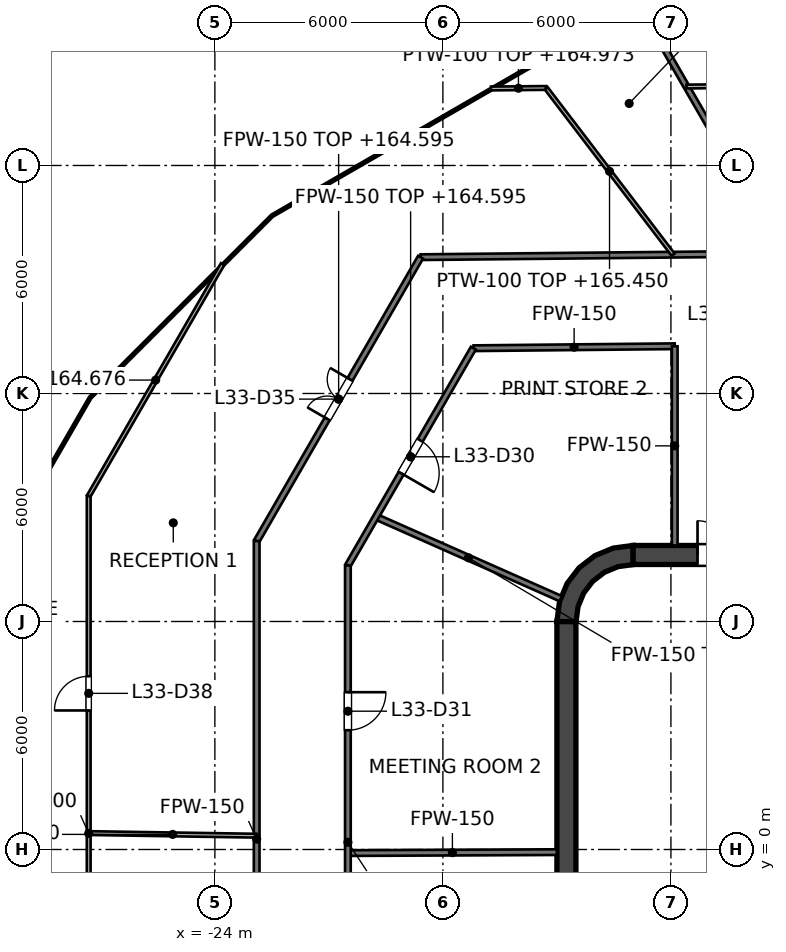
"""IFC4 building model, lengths in metres.
Left out: names, types, materials, properties, quantities, classifications, styles, units other than length and angle.
Written with IfcOpenShell. Run it as: python <this file> out.ifc"""

import sys

from ifc_helpers import new_model, si_unit, direction, frame, frame_2d, origin, place, context, subcontext, project, spatial, polyline, rectangle, outline, extrude, element, fill, save


model = new_model("IFC4")
c1 = context("Model", 3, precision=1e-05, world=origin(), true_north=direction((0.0, 1.0)))
c2 = subcontext(c1, "Body", "Model", "MODEL_VIEW")
j1 = project(units=[si_unit("LENGTHUNIT", "METRE"), si_unit("PLANEANGLEUNIT", "RADIAN")], contexts=[c1])
p1 = place(None, origin())
s1 = spatial("IfcSite", under=j1, at=p1, CompositionType="ELEMENT")
p2 = place(p1, origin())
s2 = spatial("IfcBuilding", under=s1, at=p2, CompositionType="ELEMENT")
p3 = place(p2, frame((0.0, 0.0, 161.6)))
s3 = spatial("IfcBuildingStorey", under=s2, at=p3, CompositionType="ELEMENT", Elevation=161.6)
p4 = place(p3, frame((-13.0, 7.75, 0.0), z_axis=(0.0, 0.0, 1.0), x_axis=(1.0, 0.0, 0.0)))
e1 = element("IfcWall", 1, at=p4, inside=s3, PredefinedType="SHEAR", context=c2, shape_type="SweptSolid", body=[
    extrude(rectangle(XDim=26.0, YDim=0.5, at=frame_2d((13.0, 0.0))), origin(), (0.0, 0.0, 1.0), 4.0),
])
p5 = place(p4, frame((1.7, 0.0, 0.0)))
e2 = element("IfcOpeningElement", 2, at=p5, cuts=e1, PredefinedType="OPENING", context=c2, shape_type="SweptSolid", body=[
    extrude(rectangle(XDim=1.8, YDim=2.1, at=frame_2d((0.9, 1.05))), frame((0.0, 0.25, 0.0), z_axis=(0.0, -1.0, 0.0), x_axis=(1.0, 0.0, 0.0)), (0.0, 0.0, 1.0), 0.5),
])
p6 = place(p4, frame((22.5, 0.0, 0.0)))
e3 = element("IfcOpeningElement", 3, at=p6, cuts=e1, PredefinedType="OPENING", context=c2, shape_type="SweptSolid", body=[
    extrude(rectangle(XDim=1.8, YDim=2.1, at=frame_2d((0.9, 1.05))), frame((0.0, 0.25, 0.0), z_axis=(0.0, -1.0, 0.0), x_axis=(1.0, 0.0, 0.0)), (0.0, 0.0, 1.0), 0.5),
])
p7 = place(p3, frame((-14.75, -6.0, 0.0), z_axis=(0.0, 0.0, 1.0), x_axis=(0.0, 1.0, 0.0)))
e4 = element("IfcWall", 4, at=p7, inside=s3, PredefinedType="SHEAR", context=c2, shape_type="SweptSolid", body=[
    extrude(rectangle(XDim=12.0, YDim=0.5, at=frame_2d((6.0, 0.0))), origin(), (0.0, 0.0, 1.0), 4.0),
])
p8 = place(p3, origin())
e5 = element("IfcWall", 5, at=p8, inside=s3, PredefinedType="SHEAR", context=c2, shape_type="SweptSolid", body=[
    extrude(outline(polyline([(-15.0, 6.0), (-14.496, 6.0), (-14.445, 6.387), (-14.295, 6.748), (-14.058, 7.058), (-13.748, 7.295), (-13.387, 7.445), (-13.0, 7.496), (-13.0, 8.0), (-13.518, 7.932), (-14.0, 7.732), (-14.414, 7.414), (-14.732, 7.0), (-14.932, 6.518), (-15.0, 6.0)])), origin(), (0.0, 0.0, 1.0), 4.0),
])
p9 = place(p3, frame((-11.8, -7.5, 0.0), z_axis=(0.0, 0.0, 1.0), x_axis=(0.0, 1.0, 0.0)))
e6 = element("IfcWall", 6, at=p9, inside=s3, PredefinedType="SOLIDWALL", context=c2, shape_type="SweptSolid", body=[
    extrude(rectangle(XDim=15.0, YDim=0.4, at=frame_2d((7.5, 0.0))), origin(), (0.0, 0.0, 1.0), 3.85),
])
p10 = place(p9, frame((11.3, 0.0, 0.0)))
e7 = element("IfcOpeningElement", 7, at=p10, cuts=e6, PredefinedType="OPENING", context=c2, shape_type="SweptSolid", body=[
    extrude(rectangle(XDim=1.1, YDim=2.1, at=frame_2d((0.55, 1.05))), frame((0.0, 0.2, 0.0), z_axis=(0.0, -1.0, 0.0), x_axis=(1.0, 0.0, 0.0)), (0.0, 0.0, 1.0), 0.4),
])
p11 = place(p9, frame((8.4, 0.0, 0.0)))
e8 = element("IfcOpeningElement", 8, at=p11, cuts=e6, PredefinedType="OPENING", context=c2, shape_type="SweptSolid", body=[
    extrude(rectangle(XDim=1.1, YDim=2.1, at=frame_2d((0.55, 1.05))), frame((0.0, 0.2, 0.0), z_axis=(0.0, -1.0, 0.0), x_axis=(1.0, 0.0, 0.0)), (0.0, 0.0, 1.0), 0.4),
])
p12 = place(p9, frame((5.5, 0.0, 0.0)))
e9 = element("IfcOpeningElement", 9, at=p12, cuts=e6, PredefinedType="OPENING", context=c2, shape_type="SweptSolid", body=[
    extrude(rectangle(XDim=1.1, YDim=2.1, at=frame_2d((0.55, 1.05))), frame((0.0, 0.2, 0.0), z_axis=(0.0, -1.0, 0.0), x_axis=(1.0, 0.0, 0.0)), (0.0, 0.0, 1.0), 0.4),
])
p13 = place(p9, frame((13.697, 0.0, 0.0)))
e10 = element("IfcOpeningElement", 10, at=p13, cuts=e6, PredefinedType="OPENING", context=c2, shape_type="SweptSolid", body=[
    extrude(rectangle(XDim=0.9, YDim=2.1, at=frame_2d((0.45, 1.05))), frame((0.0, 0.2, 0.0), z_axis=(0.0, -1.0, 0.0), x_axis=(1.0, 0.0, 0.0)), (0.0, 0.0, 1.0), 0.4),
])
p14 = place(p9, frame((0.403, 0.0, 0.0)))
e11 = element("IfcOpeningElement", 11, at=p14, cuts=e6, PredefinedType="OPENING", context=c2, shape_type="SweptSolid", body=[
    extrude(rectangle(XDim=0.9, YDim=2.1, at=frame_2d((0.45, 1.05))), frame((0.0, 0.2, 0.0), z_axis=(0.0, -1.0, 0.0), x_axis=(1.0, 0.0, 0.0)), (0.0, 0.0, 1.0), 0.4),
])
e12 = element("IfcWall", 12, at=p8, inside=s3, PredefinedType="SOLIDWALL", context=c2, shape_type="SweptSolid", body=[
    extrude(outline(polyline([(-12.0, -5.925), (-12.0, -5.675), (-14.25, -5.675), (-14.25, -3.025), (-12.0, -3.025), (-12.0, -2.775), (-14.25, -2.775), (-14.25, -0.125), (-12.0, -0.125), (-12.0, 0.125), (-14.25, 0.125), (-14.25, 2.775), (-12.0, 2.775), (-12.0, 3.025), (-14.25, 3.025), (-14.25, 5.675), (-12.0, 5.675), (-12.0, 5.925), (-14.25, 5.925), (-14.5, 5.925), (-14.5, 5.675), (-14.5, 3.025), (-14.5, 2.775), (-14.5, 0.125), (-14.5, -0.125), (-14.5, -2.775), (-14.5, -3.025), (-14.5, -5.675), (-14.5, -5.925), (-14.25, -5.925), (-12.0, -5.925)])), origin(), (0.0, 0.0, 1.0), 3.85),
])
p15 = place(p3, frame((-12.493, 21.639, 0.0), z_axis=(0.0, 0.0, 1.0), x_axis=(0.500006143547, -0.866021856777, 0.0)))
e13 = element("IfcWall", 13, at=p15, inside=s3, PredefinedType="PARTITIONING", context=c2, shape_type="SweptSolid", body=[
    extrude(rectangle(XDim=6.878, YDim=0.15, at=frame_2d((3.439, 0.0))), origin(), (0.0, 0.0, 1.0), 3.302),
])
p16 = place(p3, frame((-19.76, 8.755, 0.0), z_axis=(0.0, 0.0, 1.0), x_axis=(0.91424834547, -0.405154245695, 0.0)))
e14 = element("IfcWall", 14, at=p16, inside=s3, PredefinedType="PARTITIONING", context=c2, shape_type="SweptSolid", body=[
    extrude(rectangle(XDim=5.318, YDim=0.15, at=frame_2d((2.659, 0.0))), origin(), (0.0, 0.0, 1.0), 3.076),
])
p17 = place(p3, frame((-20.5, -0.094, 0.0), z_axis=(0.0, 0.0, 1.0), x_axis=(0.999990148138, 0.004438876723, 0.0)))
e15 = element("IfcWall", 15, at=p17, inside=s3, PredefinedType="PARTITIONING", context=c2, shape_type="SweptSolid", body=[
    extrude(rectangle(XDim=5.5, YDim=0.15, at=frame_2d((2.75, 0.0))), origin(), (0.0, 0.0, 1.0), 2.927),
])
p18 = place(p3, frame((-17.194, 13.191, 0.0), z_axis=(0.0, 0.0, 1.0), x_axis=(0.999950853109, 0.009914200296, 0.0)))
e16 = element("IfcWall", 16, at=p18, inside=s3, PredefinedType="PARTITIONING", context=c2, shape_type="SweptSolid", body=[
    extrude(rectangle(XDim=5.294, YDim=0.15, at=frame_2d((2.647, 0.0))), origin(), (0.0, 0.0, 1.0), 2.927),
])
p19 = place(p3, frame((-18.587, 15.587, 0.0), z_axis=(0.0, 0.0, 1.0), x_axis=(0.999950941879, 0.009905242833, 0.0)))
e17 = element("IfcWall", 17, at=p19, inside=s3, PredefinedType="PARTITIONING", context=c2, shape_type="SweptSolid", body=[
    extrude(rectangle(XDim=33.669, YDim=0.15, at=frame_2d((16.834, 0.0))), origin(), (0.0, 0.0, 1.0), 2.927),
])
p20 = place(p19, frame((7.592, 0.0, 0.0)))
e18 = element("IfcOpeningElement", 18, at=p20, cuts=e17, PredefinedType="OPENING", context=c2, shape_type="SweptSolid", body=[
    extrude(rectangle(XDim=1.0, YDim=2.1, at=frame_2d((0.5, 1.05))), frame((0.0, 0.075, 0.0), z_axis=(0.0, -1.0, 0.0), x_axis=(1.0, 0.0, 0.0)), (0.0, 0.0, 1.0), 0.15),
])
p21 = place(p19, frame((27.746, 0.0, 0.0)))
e19 = element("IfcOpeningElement", 19, at=p21, cuts=e17, PredefinedType="OPENING", context=c2, shape_type="SweptSolid", body=[
    extrude(rectangle(XDim=1.0, YDim=2.1, at=frame_2d((0.5, 1.05))), frame((0.0, 0.075, 0.0), z_axis=(0.0, -1.0, 0.0), x_axis=(1.0, 0.0, 0.0)), (0.0, 0.0, 1.0), 0.15),
])
p22 = place(p19, frame((16.335, 0.0, 0.0)))
e20 = element("IfcOpeningElement", 20, at=p22, cuts=e17, PredefinedType="OPENING", context=c2, shape_type="SweptSolid", body=[
    extrude(rectangle(XDim=1.0, YDim=2.1, at=frame_2d((0.5, 1.05))), frame((0.0, 0.075, 0.0), z_axis=(0.0, -1.0, 0.0), x_axis=(1.0, 0.0, 0.0)), (0.0, 0.0, 1.0), 0.15),
])
p23 = place(p3, frame((-20.5, 7.474, 0.0), z_axis=(0.0, 0.0, 1.0), x_axis=(0.500012665616, 0.866018091164, 0.0)))
e21 = element("IfcWall", 21, at=p23, inside=s3, PredefinedType="PARTITIONING", context=c2, shape_type="SweptSolid", body=[
    extrude(rectangle(XDim=6.602, YDim=0.15, at=frame_2d((3.301, 0.0))), origin(), (0.0, 0.0, 1.0), 2.995),
])
p24 = place(p23, frame((2.803, 0.0, 0.0)))
e22 = element("IfcOpeningElement", 22, at=p24, cuts=e21, PredefinedType="OPENING", context=c2, shape_type="SweptSolid", body=[
    extrude(rectangle(XDim=1.0, YDim=2.1, at=frame_2d((0.5, 1.05))), frame((0.0, 0.075, 0.0), z_axis=(0.0, -1.0, 0.0), x_axis=(1.0, 0.0, 0.0)), (0.0, 0.0, 1.0), 0.15),
])
p25 = place(p3, frame((-22.9, 8.117, 0.0), z_axis=(0.0, 0.0, 1.0), x_axis=(0.499996047583, 0.866027685701, 0.0)))
e23 = element("IfcWall", 23, at=p25, inside=s3, PredefinedType="PARTITIONING", context=c2, shape_type="SweptSolid", body=[
    extrude(rectangle(XDim=8.625, YDim=0.15, at=frame_2d((4.313, 0.0))), origin(), (0.0, 0.0, 1.0), 2.995),
])
p26 = place(p25, frame((3.713, 0.0, 0.0)))
e24 = element("IfcOpeningElement", 24, at=p26, cuts=e23, PredefinedType="OPENING", context=c2, shape_type="SweptSolid", body=[
    extrude(rectangle(XDim=1.2, YDim=2.1, at=frame_2d((0.6, 1.05))), frame((0.0, 0.075, 0.0), z_axis=(0.0, -1.0, 0.0), x_axis=(1.0, 0.0, 0.0)), (0.0, 0.0, 1.0), 0.15),
])
p27 = place(p3, frame((-11.9, 8.0, 0.0), z_axis=(0.0, 0.0, 1.0), x_axis=(0.0, 1.0, 0.0)))
e25 = element("IfcWall", 25, at=p27, inside=s3, PredefinedType="PARTITIONING", context=c2, shape_type="SweptSolid", body=[
    extrude(rectangle(XDim=5.243, YDim=0.15, at=frame_2d((2.622, 0.0))), origin(), (0.0, 0.0, 1.0), 2.927),
])
p28 = place(p3, frame((-20.5, -7.095, 0.0), z_axis=(0.0, 0.0, 1.0), x_axis=(0.0, 1.0, 0.0)))
e26 = element("IfcWall", 26, at=p28, inside=s3, PredefinedType="PARTITIONING", context=c2, shape_type="SweptSolid", body=[
    extrude(rectangle(XDim=14.569, YDim=0.15, at=frame_2d((7.285, 0.0))), origin(), (0.0, 0.0, 1.0), 2.927),
])
p29 = place(p28, frame((10.234, 0.0, 0.0)))
e27 = element("IfcOpeningElement", 27, at=p29, cuts=e26, PredefinedType="OPENING", context=c2, shape_type="SweptSolid", body=[
    extrude(rectangle(XDim=1.0, YDim=2.1, at=frame_2d((0.5, 1.05))), frame((0.0, 0.075, 0.0), z_axis=(0.0, -1.0, 0.0), x_axis=(1.0, 0.0, 0.0)), (0.0, 0.0, 1.0), 0.15),
])
p30 = place(p28, frame((3.0, 0.0, 0.0)))
e28 = element("IfcOpeningElement", 28, at=p30, cuts=e26, PredefinedType="OPENING", context=c2, shape_type="SweptSolid", body=[
    extrude(rectangle(XDim=1.0, YDim=2.1, at=frame_2d((0.5, 1.05))), frame((0.0, 0.075, 0.0), z_axis=(0.0, -1.0, 0.0), x_axis=(1.0, 0.0, 0.0)), (0.0, 0.0, 1.0), 0.15),
])
p31 = place(p3, frame((-22.9, -7.572, 0.0), z_axis=(0.0, 0.0, 1.0), x_axis=(0.0, 1.0, 0.0)))
e29 = element("IfcWall", 29, at=p31, inside=s3, PredefinedType="PARTITIONING", context=c2, shape_type="SweptSolid", body=[
    extrude(rectangle(XDim=15.689, YDim=0.15, at=frame_2d((7.844, 0.0))), origin(), (0.0, 0.0, 1.0), 2.927),
])
p32 = place(p31, frame((5.612, 0.0, 0.0)))
e30 = element("IfcOpeningElement", 30, at=p32, cuts=e29, PredefinedType="OPENING", context=c2, shape_type="SweptSolid", body=[
    extrude(rectangle(XDim=1.0, YDim=2.1, at=frame_2d((0.5, 1.05))), frame((0.0, 0.075, 0.0), z_axis=(0.0, -1.0, 0.0), x_axis=(1.0, 0.0, 0.0)), (0.0, 0.0, 1.0), 0.15),
])
p33 = place(p31, frame((2.469, 0.0, 0.0)))
e31 = element("IfcOpeningElement", 31, at=p33, cuts=e29, PredefinedType="OPENING", context=c2, shape_type="SweptSolid", body=[
    extrude(rectangle(XDim=1.0, YDim=2.1, at=frame_2d((0.5, 1.05))), frame((0.0, 0.075, 0.0), z_axis=(0.0, -1.0, 0.0), x_axis=(1.0, 0.0, 0.0)), (0.0, 0.0, 1.0), 0.15),
])
p34 = place(p3, frame((-15.289, 20.04, 0.0), z_axis=(0.0, 0.0, 1.0), x_axis=(0.606584285527, -0.795019185021, 0.0)))
e32 = element("IfcWall", 32, at=p34, inside=s3, PredefinedType="PARTITIONING", context=c2, shape_type="SweptSolid", body=[
    extrude(rectangle(XDim=5.518, YDim=0.1, at=frame_2d((2.759, 0.0))), origin(), (0.0, 0.0, 1.0), 3.85),
])
p35 = place(p3, frame((-27.32, 0.432, 0.0), z_axis=(0.0, 0.0, 1.0), x_axis=(0.999878719173, -0.015573918741, 0.0)))
e33 = element("IfcWall", 33, at=p35, inside=s3, PredefinedType="PARTITIONING", context=c2, shape_type="SweptSolid", body=[
    extrude(rectangle(XDim=4.421, YDim=0.1, at=frame_2d((2.21, 0.0))), origin(), (0.0, 0.0, 1.0), 3.85),
])
p36 = place(p3, frame((-16.736, 20.026, 0.0), z_axis=(0.0, 0.0, 1.0), x_axis=(0.999950458187, 0.009953952595, 0.0)))
e34 = element("IfcWall", 34, at=p36, inside=s3, PredefinedType="PARTITIONING", context=c2, shape_type="SweptSolid", body=[
    extrude(rectangle(XDim=1.447, YDim=0.1, at=frame_2d((0.724, 0.0))), origin(), (0.0, 0.0, 1.0), 3.373),
])
p37 = place(p3, frame((-11.591, 20.077, 0.0), z_axis=(0.0, 0.0, 1.0), x_axis=(0.999951585171, 0.009840087095, 0.0)))
e35 = element("IfcWall", 35, at=p37, inside=s3, PredefinedType="PARTITIONING", context=c2, shape_type="SweptSolid", body=[
    extrude(rectangle(XDim=27.763, YDim=0.1, at=frame_2d((13.882, 0.0))), origin(), (0.0, 0.0, 1.0), 2.927),
])
p38 = place(p37, frame((8.11, 0.0, 0.0)))
e36 = element("IfcOpeningElement", 36, at=p38, cuts=e35, PredefinedType="OPENING", context=c2, shape_type="SweptSolid", body=[
    extrude(rectangle(XDim=0.9, YDim=2.1, at=frame_2d((0.45, 1.05))), frame((0.0, 0.05, 0.0), z_axis=(0.0, -1.0, 0.0), x_axis=(1.0, 0.0, 0.0)), (0.0, 0.0, 1.0), 0.1),
])
p39 = place(p3, frame((-27.32, 9.301, 0.0), z_axis=(0.0, 0.0, 1.0), x_axis=(0.500043278267, 0.866000415624, 0.0)))
e37 = element("IfcWall", 37, at=p39, inside=s3, PredefinedType="PARTITIONING", context=c2, shape_type="SweptSolid", body=[
    extrude(rectangle(XDim=7.048, YDim=0.1, at=frame_2d((3.524, 0.0))), origin(), (0.0, 0.0, 1.0), 3.076),
])
p40 = place(p3, frame((-27.32, -8.452, 0.0), z_axis=(0.0, 0.0, 1.0), x_axis=(0.0, 1.0, 0.0)))
e38 = element("IfcWall", 38, at=p40, inside=s3, PredefinedType="PARTITIONING", context=c2, shape_type="SweptSolid", body=[
    extrude(rectangle(XDim=17.753, YDim=0.1, at=frame_2d((8.876, 0.0))), origin(), (0.0, 0.0, 1.0), 2.927),
])
p41 = place(p40, frame((12.111, 0.0, 0.0)))
e39 = element("IfcOpeningElement", 39, at=p41, cuts=e38, PredefinedType="OPENING", context=c2, shape_type="SweptSolid", body=[
    extrude(rectangle(XDim=0.9, YDim=2.1, at=frame_2d((0.45, 1.05))), frame((0.0, 0.05, 0.0), z_axis=(0.0, -1.0, 0.0), x_axis=(1.0, 0.0, 0.0)), (0.0, 0.0, 1.0), 0.1),
])
p42 = place(p10, origin())
e40 = element("IfcDoor", 40, at=p42, inside=s3, OperationType="DOUBLE_DOOR_SLIDING", PredefinedType="DOOR", context=c2, shape_type="SweptSolid", body=[
    extrude(rectangle(XDim=1.1, YDim=2.1, at=frame_2d((0.55, 1.05))), frame((0.0, 0.025, 0.0), z_axis=(0.0, -1.0, 0.0), x_axis=(1.0, 0.0, 0.0)), (0.0, 0.0, 1.0), 0.05),
])
fill(e7, e40)
p43 = place(p11, origin())
e41 = element("IfcDoor", 41, at=p43, inside=s3, OperationType="DOUBLE_DOOR_SLIDING", PredefinedType="DOOR", context=c2, shape_type="SweptSolid", body=[
    extrude(rectangle(XDim=1.1, YDim=2.1, at=frame_2d((0.55, 1.05))), frame((0.0, 0.025, 0.0), z_axis=(0.0, -1.0, 0.0), x_axis=(1.0, 0.0, 0.0)), (0.0, 0.0, 1.0), 0.05),
])
fill(e8, e41)
p44 = place(p13, origin())
e42 = element("IfcDoor", 42, at=p44, inside=s3, OperationType="SINGLE_SWING_LEFT", PredefinedType="DOOR", context=c2, shape_type="SweptSolid", body=[
    extrude(rectangle(XDim=0.9, YDim=2.1, at=frame_2d((0.45, 1.05))), frame((0.0, 0.025, 0.0), z_axis=(0.0, -1.0, 0.0), x_axis=(1.0, 0.0, 0.0)), (0.0, 0.0, 1.0), 0.05),
])
fill(e10, e42)
p45 = place(p5, origin())
e43 = element("IfcDoor", 43, at=p45, inside=s3, OperationType="DOUBLE_DOOR_SINGLE_SWING", PredefinedType="DOOR", context=c2, shape_type="SweptSolid", body=[
    extrude(rectangle(XDim=1.8, YDim=2.1, at=frame_2d((0.9, 1.05))), frame((0.0, 0.025, 0.0), z_axis=(0.0, -1.0, 0.0), x_axis=(1.0, 0.0, 0.0)), (0.0, 0.0, 1.0), 0.05),
])
fill(e2, e43)
p46 = place(p24, origin())
e44 = element("IfcDoor", 44, at=p46, inside=s3, OperationType="SINGLE_SWING_LEFT", PredefinedType="DOOR", context=c2, shape_type="SweptSolid", body=[
    extrude(rectangle(XDim=1.0, YDim=2.1, at=frame_2d((0.5, 1.05))), frame((0.0, 0.025, 0.0), z_axis=(0.0, -1.0, 0.0), x_axis=(1.0, 0.0, 0.0)), (0.0, 0.0, 1.0), 0.05),
])
fill(e22, e44)
p47 = place(p29, origin())
e45 = element("IfcDoor", 45, at=p47, inside=s3, OperationType="SINGLE_SWING_RIGHT", PredefinedType="DOOR", context=c2, shape_type="SweptSolid", body=[
    extrude(rectangle(XDim=1.0, YDim=2.1, at=frame_2d((0.5, 1.05))), frame((0.0, 0.025, 0.0), z_axis=(0.0, -1.0, 0.0), x_axis=(1.0, 0.0, 0.0)), (0.0, 0.0, 1.0), 0.05),
])
fill(e27, e45)
p48 = place(p26, origin())
e46 = element("IfcDoor", 46, at=p48, inside=s3, OperationType="DOUBLE_DOOR_SINGLE_SWING", PredefinedType="DOOR", context=c2, shape_type="SweptSolid", body=[
    extrude(rectangle(XDim=1.2, YDim=2.1, at=frame_2d((0.6, 1.05))), frame((0.0, 0.025, 0.0), z_axis=(0.0, -1.0, 0.0), x_axis=(1.0, 0.0, 0.0)), (0.0, 0.0, 1.0), 0.05),
])
fill(e24, e46)
p49 = place(p41, origin())
e47 = element("IfcDoor", 47, at=p49, inside=s3, OperationType="SINGLE_SWING_LEFT", PredefinedType="DOOR", context=c2, shape_type="SweptSolid", body=[
    extrude(rectangle(XDim=0.9, YDim=2.1, at=frame_2d((0.45, 1.05))), frame((0.0, 0.025, 0.0), z_axis=(0.0, -1.0, 0.0), x_axis=(1.0, 0.0, 0.0)), (0.0, 0.0, 1.0), 0.05),
])
fill(e39, e47)
save(model, sys.argv[1])
